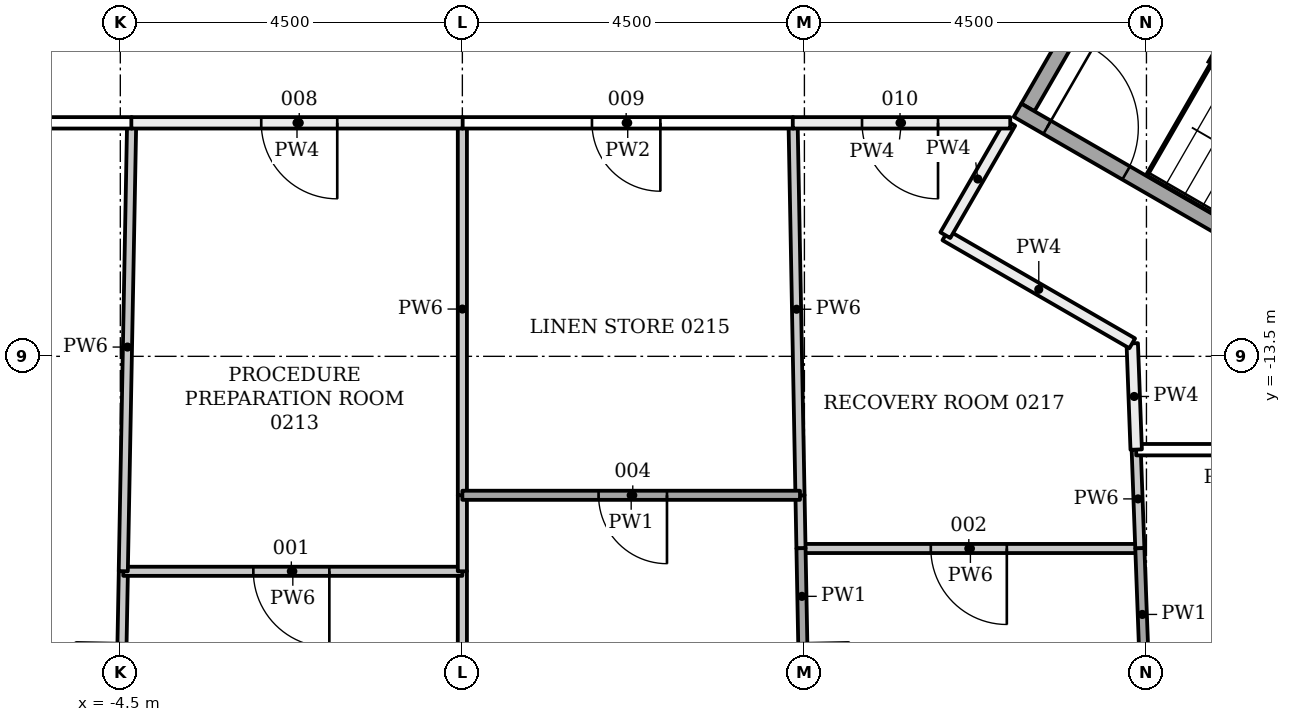
"""IFC4 building model, lengths in metres.
Left out: names, types, materials, properties, quantities, classifications, styles, units other than length and angle.
Written with IfcOpenShell. Run it as: python <this file> out.ifc"""

import sys

from ifc_helpers import new_model, si_unit, direction, frame, frame_2d, origin, place, context, subcontext, project, spatial, rectangle, extrude, element, fill, save


model = new_model("IFC4")
c1 = context("Model", 3, precision=1e-05, world=origin(), true_north=direction((0.0, 1.0)))
c2 = subcontext(c1, "Body", "Model", "MODEL_VIEW")
j1 = project(units=[si_unit("LENGTHUNIT", "METRE"), si_unit("PLANEANGLEUNIT", "RADIAN")], contexts=[c1])
p1 = place(None, origin())
s1 = spatial("IfcSite", under=j1, at=p1, CompositionType="ELEMENT")
p2 = place(p1, origin())
s2 = spatial("IfcBuilding", under=s1, at=p2, CompositionType="ELEMENT")
p3 = place(p2, frame((0.0, 0.0, 10.5)))
s3 = spatial("IfcBuildingStorey", under=s2, at=p3, CompositionType="ELEMENT", Elevation=10.5)
p4 = place(p3, frame((9.922, -5.728, -0.25), z_axis=(0.0, 0.0, 1.0), x_axis=(0.866028046028, -0.499995423472, 0.0)))
e1 = element("IfcWall", 1, at=p4, inside=s3, PredefinedType="SHEAR", context=c2, shape_type="SweptSolid", body=[
    extrude(rectangle(XDim=14.633, YDim=0.9, at=frame_2d((7.316, 0.0))), origin(), (0.0, 0.0, 1.0), 4.5),
])
p5 = place(p4, frame((7.35, 0.0, 0.25)))
e2 = element("IfcOpeningElement", 2, at=p5, cuts=e1, PredefinedType="OPENING", context=c2, shape_type="SweptSolid", body=[
    extrude(rectangle(XDim=1.5, YDim=2.1, at=frame_2d((0.75, 1.05))), frame((0.0, 0.46, 0.0), z_axis=(0.0, -1.0, 0.0), x_axis=(1.0, 0.0, 0.0)), (0.0, 0.0, 1.0), 0.92),
])
p6 = place(p3, frame((7.44, -10.226, -0.25), z_axis=(0.0, 0.0, 1.0), x_axis=(0.500022077904, 0.866012656725, 0.0)))
e3 = element("IfcWall", 3, at=p6, inside=s3, PredefinedType="SHEAR", context=c2, shape_type="SweptSolid", body=[
    extrude(rectangle(XDim=3.55, YDim=0.2, at=frame_2d((1.775, 0.0))), origin(), (0.0, 0.0, 1.0), 4.5),
])
p7 = place(p6, frame((1.175, 0.0, 0.25)))
e4 = element("IfcOpeningElement", 4, at=p7, cuts=e3, PredefinedType="OPENING", context=c2, shape_type="SweptSolid", body=[
    extrude(rectangle(XDim=1.2, YDim=2.1, at=frame_2d((0.6, 1.05))), frame((0.0, 0.11, 0.0), z_axis=(0.0, -1.0, 0.0), x_axis=(1.0, 0.0, 0.0)), (0.0, 0.0, 1.0), 0.22),
])
p8 = place(p3, frame((7.304, -10.262, -0.25), z_axis=(0.0, 0.0, 1.0), x_axis=(0.866026594901, -0.49999793692, 0.0)))
e5 = element("IfcWall", 5, at=p8, inside=s3, PredefinedType="SHEAR", context=c2, shape_type="SweptSolid", body=[
    extrude(rectangle(XDim=5.6, YDim=0.2, at=frame_2d((2.8, 0.0))), origin(), (0.0, 0.0, 1.0), 4.5),
])
p9 = place(p8, frame((0.45, 0.0, 0.25)))
e6 = element("IfcOpeningElement", 6, at=p9, cuts=e5, PredefinedType="OPENING", context=c2, shape_type="SweptSolid", body=[
    extrude(rectangle(XDim=1.2, YDim=2.1, at=frame_2d((0.6, 1.05))), frame((0.0, 0.11, 0.0), z_axis=(0.0, -1.0, 0.0), x_axis=(1.0, 0.0, 0.0)), (0.0, 0.0, 1.0), 0.22),
])
p10 = place(p3, frame((9.413, -6.61, -0.25), z_axis=(0.0, 0.0, 1.0), x_axis=(0.866018442252, -0.500012057535, 0.0)))
e7 = element("IfcWall", 7, at=p10, inside=s3, PredefinedType="SHEAR", context=c2, shape_type="SweptSolid", body=[
    extrude(rectangle(XDim=7.2, YDim=1.136, at=frame_2d((3.6, 0.0))), origin(), (0.0, 0.0, 1.0), 4.5),
])
p11 = place(p3, frame((0.0, -20.257, 0.0), z_axis=(0.0, 0.0, 1.0), x_axis=(0.0, 1.0, 0.0)))
e8 = element("IfcWall", 8, at=p11, inside=s3, PredefinedType="PARTITIONING", context=c2, shape_type="SweptSolid", body=[
    extrude(rectangle(XDim=3.933, YDim=0.12, at=frame_2d((1.967, 0.0))), origin(), (0.0, 0.0, 1.0), 3.638),
])
p12 = place(p3, frame((-4.46, -16.324, 0.0), z_axis=(0.0, 0.0, 1.0), x_axis=(-0.018678891577, -0.999825534286, 0.0)))
e9 = element("IfcWall", 9, at=p12, inside=s3, PredefinedType="PARTITIONING", context=c2, shape_type="SweptSolid", body=[
    extrude(rectangle(XDim=0.967, YDim=0.12, at=frame_2d((0.484, 0.0))), origin(), (0.0, 0.0, 1.0), 3.638),
])
p13 = place(p3, frame((0.0, -16.328, 0.0), z_axis=(0.0, 0.0, 1.0), x_axis=(-1.0, 0.0, 0.0)))
e10 = element("IfcWall", 10, at=p13, inside=s3, PredefinedType="PARTITIONING", context=c2, shape_type="SweptSolid", body=[
    extrude(rectangle(XDim=4.461, YDim=0.12, at=frame_2d((2.23, 0.0))), origin(), (0.0, 0.0, 1.0), 3.638),
])
p14 = place(p13, frame((1.75, 0.0, 0.0)))
e11 = element("IfcOpeningElement", 11, at=p14, cuts=e10, PredefinedType="OPENING", context=c2, shape_type="SweptSolid", body=[
    extrude(rectangle(XDim=1.0, YDim=2.1, at=frame_2d((0.5, 1.05))), frame((0.0, 0.07, 0.0), z_axis=(0.0, -1.0, 0.0), x_axis=(1.0, 0.0, 0.0)), (0.0, 0.0, 1.0), 0.14),
])
p15 = place(p3, frame((8.978, -17.767, 0.0), z_axis=(0.0, 0.0, 1.0), x_axis=(-0.037229075286, 0.999306757684, 0.0)))
e12 = element("IfcWall", 12, at=p15, inside=s3, PredefinedType="PARTITIONING", context=c2, shape_type="SweptSolid", body=[
    extrude(rectangle(XDim=1.744, YDim=0.12, at=frame_2d((0.872, 0.0))), origin(), (0.0, 0.0, 1.0), 3.638),
])
p16 = place(p3, frame((4.455, -16.024, 0.0), z_axis=(0.0, 0.0, 1.0), x_axis=(0.018879100933, -0.999821773892, 0.0)))
e13 = element("IfcWall", 13, at=p16, inside=s3, PredefinedType="PARTITIONING", context=c2, shape_type="SweptSolid", body=[
    extrude(rectangle(XDim=1.267, YDim=0.12, at=frame_2d((0.634, 0.0))), origin(), (0.0, 0.0, 1.0), 3.638),
])
p17 = place(p3, frame((8.913, -16.028, 0.0), z_axis=(0.0, 0.0, 1.0), x_axis=(-1.0, 0.0, 0.0)))
e14 = element("IfcWall", 14, at=p17, inside=s3, PredefinedType="PARTITIONING", context=c2, shape_type="SweptSolid", body=[
    extrude(rectangle(XDim=4.458, YDim=0.12, at=frame_2d((2.229, 0.0))), origin(), (0.0, 0.0, 1.0), 3.638),
])
p18 = place(p17, frame((1.75, 0.0, 0.0)))
e15 = element("IfcOpeningElement", 15, at=p18, cuts=e14, PredefinedType="OPENING", context=c2, shape_type="SweptSolid", body=[
    extrude(rectangle(XDim=1.0, YDim=2.1, at=frame_2d((0.5, 1.05))), frame((0.0, 0.07, 0.0), z_axis=(0.0, -1.0, 0.0), x_axis=(1.0, 0.0, 0.0)), (0.0, 0.0, 1.0), 0.14),
])
p19 = place(p3, frame((8.865, -14.724, 0.0), z_axis=(0.0, 0.0, 1.0), x_axis=(0.03688700211, -0.999319442959, 0.0)))
e16 = element("IfcWall", 16, at=p19, inside=s3, PredefinedType="PARTITIONING", context=c2, shape_type="SweptSolid", body=[
    extrude(rectangle(XDim=1.304, YDim=0.12, at=frame_2d((0.652, 0.0))), origin(), (0.0, 0.0, 1.0), 3.638),
])
p20 = place(p3, frame((11.237, -14.728, 0.0), z_axis=(0.0, 0.0, 1.0), x_axis=(-1.0, 0.0, 0.0)))
e17 = element("IfcWall", 17, at=p20, inside=s3, PredefinedType="PARTITIONING", context=c2, shape_type="SweptSolid", body=[
    extrude(rectangle(XDim=2.372, YDim=0.15, at=frame_2d((1.186, 0.0))), origin(), (0.0, 0.0, 1.0), 3.638),
])
p21 = place(p3, frame((0.0, -15.324, 0.0), z_axis=(0.0, 0.0, 1.0), x_axis=(0.0, -1.0, 0.0)))
e18 = element("IfcWall", 18, at=p21, inside=s3, PredefinedType="PARTITIONING", context=c2, shape_type="SweptSolid", body=[
    extrude(rectangle(XDim=1.004, YDim=0.12, at=frame_2d((0.502, 0.0))), origin(), (0.0, 0.0, 1.0), 3.638),
])
p22 = place(p3, frame((4.442, -15.328, 0.0), z_axis=(0.0, 0.0, 1.0), x_axis=(-1.0, 0.0, 0.0)))
e19 = element("IfcWall", 19, at=p22, inside=s3, PredefinedType="PARTITIONING", context=c2, shape_type="SweptSolid", body=[
    extrude(rectangle(XDim=4.442, YDim=0.12, at=frame_2d((2.221, 0.0))), origin(), (0.0, 0.0, 1.0), 3.638),
])
p23 = place(p22, frame((1.75, 0.0, 0.0)))
e20 = element("IfcOpeningElement", 20, at=p23, cuts=e19, PredefinedType="OPENING", context=c2, shape_type="SweptSolid", body=[
    extrude(rectangle(XDim=0.9, YDim=2.1, at=frame_2d((0.45, 1.05))), frame((0.0, 0.07, 0.0), z_axis=(0.0, -1.0, 0.0), x_axis=(1.0, 0.0, 0.0)), (0.0, 0.0, 1.0), 0.14),
])
p24 = place(p3, frame((4.455, -16.027, 0.0), z_axis=(0.0, 0.0, 1.0), x_axis=(-0.01874670497, 0.999824265085, 0.0)))
e21 = element("IfcWall", 21, at=p24, inside=s3, PredefinedType="PARTITIONING", context=c2, shape_type="SweptSolid", body=[
    extrude(rectangle(XDim=0.703, YDim=0.12, at=frame_2d((0.352, 0.0))), origin(), (0.0, 0.0, 1.0), 3.638),
])
p25 = place(p3, frame((-4.461, -16.327, 0.0), z_axis=(0.0, 0.0, 1.0), x_axis=(0.018624139004, 0.999826555682, 0.0)))
e22 = element("IfcWall", 22, at=p25, inside=s3, PredefinedType="PARTITIONING", context=c2, shape_type="SweptSolid", body=[
    extrude(rectangle(XDim=5.899, YDim=0.12, at=frame_2d((2.949, 0.0))), origin(), (0.0, 0.0, 1.0), 3.638),
])
p26 = place(p3, frame((-4.347, -10.428, 0.0), z_axis=(0.0, 0.0, 1.0), x_axis=(-1.0, 0.0, 0.0)))
e23 = element("IfcWall", 23, at=p26, inside=s3, PredefinedType="PARTITIONING", context=c2, shape_type="SweptSolid", body=[
    extrude(rectangle(XDim=6.902, YDim=0.15, at=frame_2d((3.451, 0.0))), origin(), (0.0, 0.0, 1.0), 3.638),
])
p27 = place(p26, frame((2.55, 0.0, 0.0)))
e24 = element("IfcOpeningElement", 24, at=p27, cuts=e23, PredefinedType="OPENING", context=c2, shape_type="SweptSolid", body=[
    extrude(rectangle(XDim=1.8, YDim=2.1, at=frame_2d((0.9, 1.05))), frame((0.0, 0.085, 0.0), z_axis=(0.0, -1.0, 0.0), x_axis=(1.0, 0.0, 0.0)), (0.0, 0.0, 1.0), 0.17),
])
p28 = place(p3, frame((0.0, -15.328, 0.0), z_axis=(0.0, 0.0, 1.0), x_axis=(0.0, 1.0, 0.0)))
e25 = element("IfcWall", 25, at=p28, inside=s3, PredefinedType="PARTITIONING", context=c2, shape_type="SweptSolid", body=[
    extrude(rectangle(XDim=4.9, YDim=0.12, at=frame_2d((2.45, 0.0))), origin(), (0.0, 0.0, 1.0), 3.638),
])
p29 = place(p3, frame((0.004, -10.428, 0.0), z_axis=(0.0, 0.0, 1.0), x_axis=(-1.0, 0.0, 0.0)))
e26 = element("IfcWall", 26, at=p29, inside=s3, PredefinedType="PARTITIONING", context=c2, shape_type="SweptSolid", body=[
    extrude(rectangle(XDim=4.359, YDim=0.15, at=frame_2d((2.179, 0.0))), origin(), (0.0, 0.0, 1.0), 3.638),
])
p30 = place(p29, frame((1.65, 0.0, 0.0)))
e27 = element("IfcOpeningElement", 27, at=p30, cuts=e26, PredefinedType="OPENING", context=c2, shape_type="SweptSolid", body=[
    extrude(rectangle(XDim=1.0, YDim=2.1, at=frame_2d((0.5, 1.05))), frame((0.0, 0.085, 0.0), z_axis=(0.0, -1.0, 0.0), x_axis=(1.0, 0.0, 0.0)), (0.0, 0.0, 1.0), 0.17),
])
p31 = place(p3, frame((4.442, -15.332, 0.0), z_axis=(0.0, 0.0, 1.0), x_axis=(-0.018519952131, 0.999828490979, 0.0)))
e28 = element("IfcWall", 28, at=p31, inside=s3, PredefinedType="PARTITIONING", context=c2, shape_type="SweptSolid", body=[
    extrude(rectangle(XDim=4.904, YDim=0.12, at=frame_2d((2.452, 0.0))), origin(), (0.0, 0.0, 1.0), 3.638),
])
p32 = place(p3, frame((4.355, -10.428, 0.0), z_axis=(0.0, 0.0, 1.0), x_axis=(-1.0, 0.0, 0.0)))
e29 = element("IfcWall", 29, at=p32, inside=s3, PredefinedType="PARTITIONING", context=c2, shape_type="SweptSolid", body=[
    extrude(rectangle(XDim=4.359, YDim=0.15, at=frame_2d((2.179, 0.0))), origin(), (0.0, 0.0, 1.0), 3.638),
])
p33 = place(p32, frame((1.75, 0.0, 0.0)))
e30 = element("IfcOpeningElement", 30, at=p33, cuts=e29, PredefinedType="OPENING", context=c2, shape_type="SweptSolid", body=[
    extrude(rectangle(XDim=0.9, YDim=2.1, at=frame_2d((0.45, 1.05))), frame((0.0, 0.085, 0.0), z_axis=(0.0, -1.0, 0.0), x_axis=(1.0, 0.0, 0.0)), (0.0, 0.0, 1.0), 0.17),
])
p34 = place(p3, frame((8.865, -14.727, 0.0), z_axis=(0.0, 0.0, 1.0), x_axis=(-0.037173032443, 0.999308843981, 0.0)))
e31 = element("IfcWall", 31, at=p34, inside=s3, PredefinedType="PARTITIONING", context=c2, shape_type="SweptSolid", body=[
    extrude(rectangle(XDim=1.399, YDim=0.15, at=frame_2d((0.699, 0.0))), origin(), (0.0, 0.0, 1.0), 3.638),
])
p35 = place(p3, frame((8.813, -13.329, 0.0), z_axis=(0.0, 0.0, 1.0), x_axis=(-0.865804661524, 0.50038214205, 0.0)))
e32 = element("IfcWall", 32, at=p35, inside=s3, PredefinedType="PARTITIONING", context=c2, shape_type="SweptSolid", body=[
    extrude(rectangle(XDim=2.84, YDim=0.15, at=frame_2d((1.42, 0.0))), origin(), (0.0, 0.0, 1.0), 3.638),
])
p36 = place(p3, frame((6.354, -11.906, 0.0), z_axis=(0.0, 0.0, 1.0), x_axis=(0.500291894738, 0.865856812677, 0.0)))
e33 = element("IfcWall", 33, at=p36, inside=s3, PredefinedType="PARTITIONING", context=c2, shape_type="SweptSolid", body=[
    extrude(rectangle(XDim=1.707, YDim=0.15, at=frame_2d((0.854, 0.0))), origin(), (0.0, 0.0, 1.0), 4.25),
])
p37 = place(p3, frame((7.208, -10.428, 0.0), z_axis=(0.0, 0.0, 1.0), x_axis=(-1.0, 0.0, 0.0)))
e34 = element("IfcWall", 34, at=p37, inside=s3, PredefinedType="PARTITIONING", context=c2, shape_type="SweptSolid", body=[
    extrude(rectangle(XDim=2.861, YDim=0.15, at=frame_2d((1.431, 0.0))), origin(), (0.0, 0.0, 1.0), 3.638),
])
p38 = place(p37, frame((0.95, 0.0, 0.0)))
e35 = element("IfcOpeningElement", 35, at=p38, cuts=e34, PredefinedType="OPENING", context=c2, shape_type="SweptSolid", body=[
    extrude(rectangle(XDim=1.0, YDim=2.1, at=frame_2d((0.5, 1.05))), frame((0.0, 0.085, 0.0), z_axis=(0.0, -1.0, 0.0), x_axis=(1.0, 0.0, 0.0)), (0.0, 0.0, 1.0), 0.17),
])
p39 = place(p9, origin())
e36 = element("IfcDoor", 36, at=p39, inside=s3, OperationType="SINGLE_SWING_LEFT", PredefinedType="DOOR", context=c2, shape_type="SweptSolid", body=[
    extrude(rectangle(XDim=1.2, YDim=2.1, at=frame_2d((0.6, 1.05))), frame((0.0, 0.025, 0.0), z_axis=(0.0, -1.0, 0.0), x_axis=(1.0, 0.0, 0.0)), (0.0, 0.0, 1.0), 0.05),
])
fill(e6, e36)
p40 = place(p14, origin())
e37 = element("IfcDoor", 37, at=p40, inside=s3, OperationType="SINGLE_SWING_RIGHT", PredefinedType="DOOR", context=c2, shape_type="SweptSolid", body=[
    extrude(rectangle(XDim=1.0, YDim=2.1, at=frame_2d((0.5, 1.05))), frame((0.0, 0.025, 0.0), z_axis=(0.0, -1.0, 0.0), x_axis=(1.0, 0.0, 0.0)), (0.0, 0.0, 1.0), 0.05),
])
fill(e11, e37)
p41 = place(p18, origin())
e38 = element("IfcDoor", 38, at=p41, inside=s3, OperationType="SINGLE_SWING_RIGHT", PredefinedType="DOOR", context=c2, shape_type="SweptSolid", body=[
    extrude(rectangle(XDim=1.0, YDim=2.1, at=frame_2d((0.5, 1.05))), frame((0.0, 0.025, 0.0), z_axis=(0.0, -1.0, 0.0), x_axis=(1.0, 0.0, 0.0)), (0.0, 0.0, 1.0), 0.05),
])
fill(e15, e38)
p42 = place(p23, origin())
e39 = element("IfcDoor", 39, at=p42, inside=s3, OperationType="SINGLE_SWING_LEFT", PredefinedType="DOOR", context=c2, shape_type="SweptSolid", body=[
    extrude(rectangle(XDim=0.9, YDim=2.1, at=frame_2d((0.45, 1.05))), frame((0.0, 0.025, 0.0), z_axis=(0.0, -1.0, 0.0), x_axis=(1.0, 0.0, 0.0)), (0.0, 0.0, 1.0), 0.05),
])
fill(e20, e39)
p43 = place(p30, origin())
e40 = element("IfcDoor", 40, at=p43, inside=s3, OperationType="SINGLE_SWING_LEFT", PredefinedType="DOOR", context=c2, shape_type="SweptSolid", body=[
    extrude(rectangle(XDim=1.0, YDim=2.1, at=frame_2d((0.5, 1.05))), frame((0.0, 0.025, 0.0), z_axis=(0.0, -1.0, 0.0), x_axis=(1.0, 0.0, 0.0)), (0.0, 0.0, 1.0), 0.05),
])
fill(e27, e40)
p44 = place(p33, origin())
e41 = element("IfcDoor", 41, at=p44, inside=s3, OperationType="SINGLE_SWING_RIGHT", PredefinedType="DOOR", context=c2, shape_type="SweptSolid", body=[
    extrude(rectangle(XDim=0.9, YDim=2.1, at=frame_2d((0.45, 1.05))), frame((0.0, 0.025, 0.0), z_axis=(0.0, -1.0, 0.0), x_axis=(1.0, 0.0, 0.0)), (0.0, 0.0, 1.0), 0.05),
])
fill(e30, e41)
p45 = place(p38, origin())
e42 = element("IfcDoor", 42, at=p45, inside=s3, OperationType="SINGLE_SWING_RIGHT", PredefinedType="DOOR", context=c2, shape_type="SweptSolid", body=[
    extrude(rectangle(XDim=1.0, YDim=2.1, at=frame_2d((0.5, 1.05))), frame((0.0, 0.025, 0.0), z_axis=(0.0, -1.0, 0.0), x_axis=(1.0, 0.0, 0.0)), (0.0, 0.0, 1.0), 0.05),
])
fill(e35, e42)
save(model, sys.argv[1])
